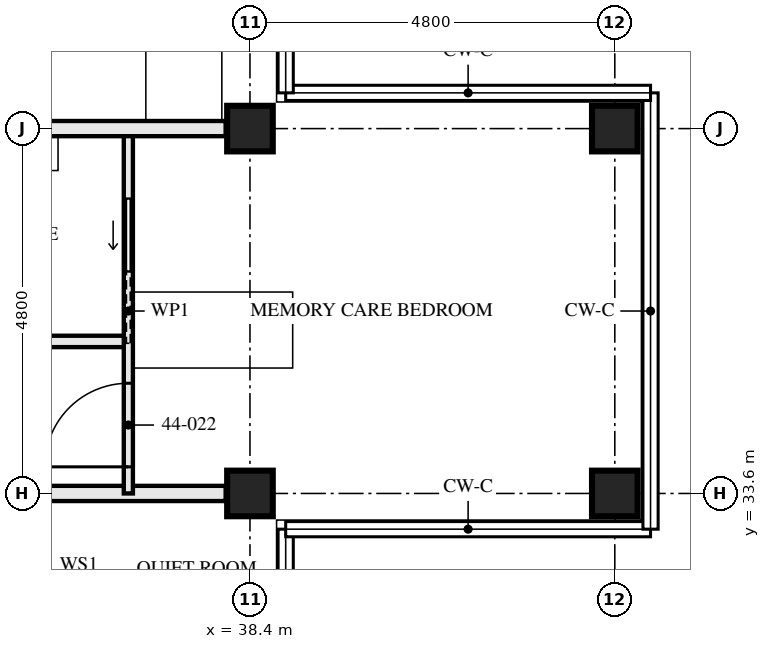
"""IFC4 building model, lengths in metres.
Left out: names, types, materials, properties, quantities, classifications, styles, units other than length and angle.
Written with IfcOpenShell. Run it as: python <this file> out.ifc"""

import sys

from ifc_helpers import new_model, si_unit, direction, frame, frame_2d, origin, origin_2d, place, context, subcontext, project, spatial, rectangle, hollow_rectangle, extrude, element, fill, save


model = new_model("IFC4")
c1 = context("Model", 3, precision=1e-05, world=origin(), true_north=direction((0.0, 1.0)))
c2 = subcontext(c1, "Body", "Model", "MODEL_VIEW")
j1 = project(units=[si_unit("LENGTHUNIT", "METRE"), si_unit("PLANEANGLEUNIT", "RADIAN")], contexts=[c1])
p1 = place(None, origin())
s1 = spatial("IfcSite", under=j1, at=p1, CompositionType="ELEMENT")
p2 = place(p1, origin())
s2 = spatial("IfcBuilding", under=s1, at=p2, CompositionType="ELEMENT")
p3 = place(p2, frame((0.0, 0.0, 162.0)))
s3 = spatial("IfcBuildingStorey", under=s2, at=p3, CompositionType="ELEMENT", Elevation=162.0)
for number, where, z_axis, x_axis in (
    (1, (38.4, 33.6, 0.0), (0.0, 0.0, 1.0), (0.0, 1.0, 0.0)),
    (2, (38.4, 38.4, 0.0), (0.0, 0.0, 1.0), (0.0, 1.0, 0.0)),
    (3, (43.2, 33.6, 0.0), (0.0, 0.0, 1.0), (0.0, 1.0, 0.0)),
    (4, (43.2, 38.4, 0.0), (0.0, 0.0, 1.0), (0.0, 1.0, 0.0)),
):
    element("IfcColumn", number, at=place(p3, frame(where, z_axis=z_axis, x_axis=x_axis)), inside=s3, PredefinedType="COLUMN", context=c2, shape_type="SweptSolid", body=[
        extrude(hollow_rectangle(XDim=0.6, YDim=0.6, WallThickness=0.06, at=origin_2d()), origin(), (0.0, 0.0, 1.0), 3.5),
    ])
p4 = place(p3, frame((38.08, 33.6, 0.0), z_axis=(0.0, 0.0, 1.0), x_axis=(-1.0, 0.0, 0.0)))
e5 = element("IfcWall", 5, at=p4, inside=s3, PredefinedType="PARTITIONING", context=c2, shape_type="SweptSolid", body=[
    extrude(rectangle(XDim=7.28, YDim=0.2, at=frame_2d((3.64, 0.0))), origin(), (0.0, 0.0, 1.0), 2.55),
])
p5 = place(p3, frame((36.8, 35.6, 0.0), z_axis=(0.0, 0.0, 1.0), x_axis=(-1.0, 0.0, 0.0)))
e6 = element("IfcWall", 6, at=p5, inside=s3, PredefinedType="PARTITIONING", context=c2, shape_type="SweptSolid", body=[
    extrude(rectangle(XDim=3.0, YDim=0.15, at=frame_2d((1.5, 0.0))), origin(), (0.0, 0.0, 1.0), 3.33),
])
p6 = place(p3, frame((36.8, 33.6, 0.0), z_axis=(0.0, 0.0, 1.0), x_axis=(0.0, 1.0, 0.0)))
e7 = element("IfcWall", 7, at=p6, inside=s3, PredefinedType="PARTITIONING", context=c2, shape_type="SweptSolid", body=[
    extrude(rectangle(XDim=4.8, YDim=0.12, at=frame_2d((2.4, 0.0))), origin(), (0.0, 0.0, 1.0), 3.33),
])
p7 = place(p6, frame((0.35, 0.0, 0.0)))
e8 = element("IfcOpeningElement", 8, at=p7, cuts=e7, PredefinedType="OPENING", context=c2, shape_type="SweptSolid", body=[
    extrude(rectangle(XDim=1.1, YDim=2.1, at=frame_2d((0.55, 1.05))), frame((0.0, 0.071, 0.0), z_axis=(0.0, -1.0, 0.0), x_axis=(1.0, 0.0, 0.0)), (0.0, 0.0, 1.0), 0.141),
])
p8 = place(p6, frame((2.925, 0.0, 0.0)))
e9 = element("IfcOpeningElement", 9, at=p8, cuts=e7, PredefinedType="OPENING", context=c2, shape_type="SweptSolid", body=[
    extrude(rectangle(XDim=0.95, YDim=2.1, at=frame_2d((0.475, 1.05))), frame((0.0, 0.071, 0.0), z_axis=(0.0, -1.0, 0.0), x_axis=(1.0, 0.0, 0.0)), (0.0, 0.0, 1.0), 0.141),
])
p9 = place(p3, frame((38.08, 38.4, 0.0), z_axis=(0.0, 0.0, 1.0), x_axis=(-1.0, 0.0, 0.0)))
e10 = element("IfcWall", 10, at=p9, inside=s3, PredefinedType="PARTITIONING", context=c2, shape_type="SweptSolid", body=[
    extrude(rectangle(XDim=7.28, YDim=0.2, at=frame_2d((3.64, 0.0))), origin(), (0.0, 0.0, 1.0), 2.55),
])
p10 = place(p7, origin())
e11 = element("IfcDoor", 11, at=p10, inside=s3, OperationType="SINGLE_SWING_RIGHT", PredefinedType="DOOR", context=c2, shape_type="SweptSolid", body=[
    extrude(rectangle(XDim=1.1, YDim=2.1, at=frame_2d((0.55, 1.05))), frame((0.0, 0.022, 0.0), z_axis=(0.0, -1.0, 0.0), x_axis=(1.0, 0.0, 0.0)), (0.0, 0.0, 1.0), 0.044),
])
fill(e8, e11)
p11 = place(p8, origin())
e12 = element("IfcDoor", 12, at=p11, inside=s3, OperationType="SLIDING_TO_RIGHT", PredefinedType="DOOR", context=c2, shape_type="SweptSolid", body=[
    extrude(rectangle(XDim=0.95, YDim=2.1, at=frame_2d((0.475, 1.05))), frame((0.0, 0.022, 0.0), z_axis=(0.0, -1.0, 0.0), x_axis=(1.0, 0.0, 0.0)), (0.0, 0.0, 1.0), 0.044),
])
fill(e9, e12)
save(model, sys.argv[1])
